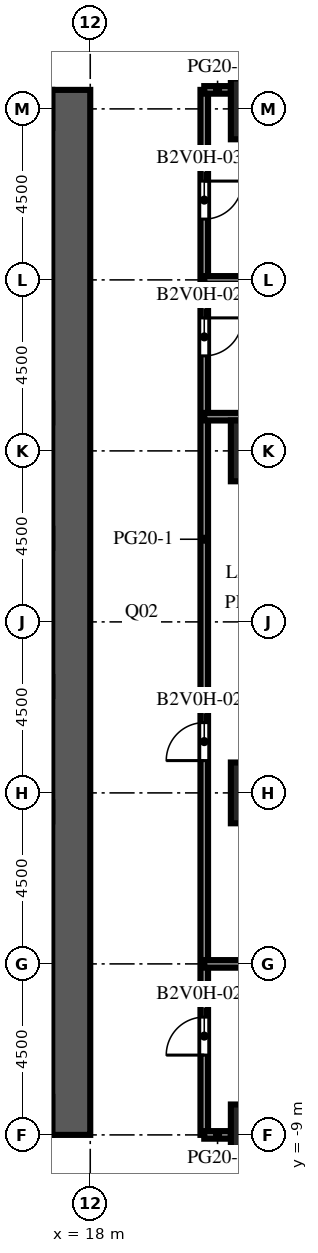
"""IFC4 building model, lengths in metres.
Left out: names, types, materials, properties, quantities, classifications, styles, units other than length and angle.
Written with IfcOpenShell. Run it as: python <this file> out.ifc"""

import sys

from ifc_helpers import new_model, si_unit, direction, frame, frame_2d, origin, origin_2d, place, context, subcontext, project, spatial, rectangle, extrude, element, fill, save


model = new_model("IFC4")
c1 = context("Model", 3, precision=1e-05, world=origin(), true_north=direction((0.0, 1.0)))
c2 = subcontext(c1, "Body", "Model", "MODEL_VIEW")
j1 = project(units=[si_unit("LENGTHUNIT", "METRE"), si_unit("PLANEANGLEUNIT", "RADIAN")], contexts=[c1])
p1 = place(None, origin())
s1 = spatial("IfcSite", under=j1, at=p1, CompositionType="ELEMENT")
p2 = place(p1, origin())
s2 = spatial("IfcBuilding", under=s1, at=p2, CompositionType="ELEMENT")
p3 = place(p2, frame((0.0, 0.0, 41.9)))
s3 = spatial("IfcBuildingStorey", under=s2, at=p3, CompositionType="ELEMENT", Elevation=41.9)
for number, where, z_axis, x_axis in (
    (1, (22.5, -9.0, -0.45), (0.0, 0.0, 1.0), (1.0, 0.0, 0.0)),
    (2, (22.5, 0.0, -0.45), (0.0, 0.0, 1.0), (1.0, 0.0, 0.0)),
    (3, (22.5, 9.0, -0.45), (0.0, 0.0, 1.0), (1.0, 0.0, 0.0)),
    (4, (22.5, 18.0, -0.45), (0.0, 0.0, 1.0), (1.0, 0.0, 0.0)),
):
    element("IfcColumn", number, at=place(p3, frame(where, z_axis=z_axis, x_axis=x_axis)), inside=s3, PredefinedType="COLUMN", context=c2, shape_type="SweptSolid", body=[
        extrude(rectangle(XDim=1.6, YDim=1.6, at=origin_2d()), origin(), (0.0, 0.0, 1.0), 4.55),
    ])
p4 = place(p3, frame((17.5, -9.0, 0.0), z_axis=(0.0, 0.0, 1.0), x_axis=(0.0, 1.0, 0.0)))
e5 = element("IfcWall", 5, at=p4, inside=s3, PredefinedType="SHEAR", context=c2, shape_type="SweptSolid", body=[
    extrude(rectangle(XDim=27.5, YDim=1.0, at=frame_2d((13.75, 0.0))), origin(), (0.0, 0.0, 1.0), 4.1),
])
p5 = place(p4, frame((12.55, 0.0, 0.0)))
e6 = element("IfcOpeningElement", 6, at=p5, cuts=e5, PredefinedType="OPENING", context=c2, shape_type="SweptSolid", body=[
    extrude(rectangle(XDim=2.4, YDim=2.4, at=frame_2d((1.2, 1.2))), frame((0.0, 0.51, 0.0), z_axis=(0.0, -1.0, 0.0), x_axis=(1.0, 0.0, 0.0)), (0.0, 0.0, 1.0), 1.02),
])
p6 = place(p4, frame((6.825, 0.0, 0.0)))
e7 = element("IfcOpeningElement", 7, at=p6, cuts=e5, PredefinedType="OPENING", context=c2, shape_type="SweptSolid", body=[
    extrude(rectangle(XDim=1.2, YDim=2.1, at=frame_2d((0.6, 1.05))), frame((0.0, 0.51, 0.0), z_axis=(0.0, -1.0, 0.0), x_axis=(1.0, 0.0, 0.0)), (0.0, 0.0, 1.0), 1.02),
])
p7 = place(p4, frame((19.475, 0.0, 0.0)))
e8 = element("IfcOpeningElement", 8, at=p7, cuts=e5, PredefinedType="OPENING", context=c2, shape_type="SweptSolid", body=[
    extrude(rectangle(XDim=1.2, YDim=2.1, at=frame_2d((0.6, 1.05))), frame((0.0, 0.51, 0.0), z_axis=(0.0, -1.0, 0.0), x_axis=(1.0, 0.0, 0.0)), (0.0, 0.0, 1.0), 1.02),
])
p8 = place(p3, frame((21.0, 18.5, 0.0), z_axis=(0.0, 0.0, 1.0), x_axis=(0.0, -1.0, 0.0)))
e9 = element("IfcWall", 9, at=p8, inside=s3, PredefinedType="PARTITIONING", context=c2, shape_type="SweptSolid", body=[
    extrude(rectangle(XDim=27.5, YDim=0.2, at=frame_2d((13.75, 0.0))), origin(), (0.0, 0.0, 1.0), 3.65),
])
p9 = place(p8, frame((24.4, 0.0, 0.0)))
e10 = element("IfcOpeningElement", 10, at=p9, cuts=e9, PredefinedType="OPENING", context=c2, shape_type="SweptSolid", body=[
    extrude(rectangle(XDim=1.0, YDim=2.1, at=frame_2d((0.5, 1.05))), frame((0.0, 0.11, 0.0), z_axis=(0.0, -1.0, 0.0), x_axis=(1.0, 0.0, 0.0)), (0.0, 0.0, 1.0), 0.22),
])
p10 = place(p8, frame((16.65, 0.0, 0.0)))
e11 = element("IfcOpeningElement", 11, at=p10, cuts=e9, PredefinedType="OPENING", context=c2, shape_type="SweptSolid", body=[
    extrude(rectangle(XDim=1.0, YDim=2.1, at=frame_2d((0.5, 1.05))), frame((0.0, 0.11, 0.0), z_axis=(0.0, -1.0, 0.0), x_axis=(1.0, 0.0, 0.0)), (0.0, 0.0, 1.0), 0.22),
])
p11 = place(p8, frame((6.0, 0.0, 0.0)))
e12 = element("IfcOpeningElement", 12, at=p11, cuts=e9, PredefinedType="OPENING", context=c2, shape_type="SweptSolid", body=[
    extrude(rectangle(XDim=1.0, YDim=2.1, at=frame_2d((0.5, 1.05))), frame((0.0, 0.11, 0.0), z_axis=(0.0, -1.0, 0.0), x_axis=(1.0, 0.0, 0.0)), (0.0, 0.0, 1.0), 0.22),
])
p12 = place(p8, frame((2.4, 0.0, 0.0)))
e13 = element("IfcOpeningElement", 13, at=p12, cuts=e9, PredefinedType="OPENING", context=c2, shape_type="SweptSolid", body=[
    extrude(rectangle(XDim=1.0, YDim=2.1, at=frame_2d((0.5, 1.05))), frame((0.0, 0.11, 0.0), z_axis=(0.0, -1.0, 0.0), x_axis=(1.0, 0.0, 0.0)), (0.0, 0.0, 1.0), 0.22),
])
p13 = place(p3, frame((21.0, -9.0, 0.0), z_axis=(0.0, 0.0, 1.0), x_axis=(1.0, 0.0, 0.0)))
e14 = element("IfcWall", 14, at=p13, inside=s3, PredefinedType="PARTITIONING", context=c2, shape_type="SweptSolid", body=[
    extrude(rectangle(XDim=0.7, YDim=0.2, at=frame_2d((0.35, 0.0))), origin(), (0.0, 0.0, 1.0), 3.65),
])
p14 = place(p3, frame((21.0, -4.5, 0.0), z_axis=(0.0, 0.0, 1.0), x_axis=(1.0, 0.0, 0.0)))
e15 = element("IfcWall", 15, at=p14, inside=s3, PredefinedType="PARTITIONING", context=c2, shape_type="SweptSolid", body=[
    extrude(rectangle(XDim=5.3, YDim=0.2, at=frame_2d((2.65, 0.0))), origin(), (0.0, 0.0, 1.0), 3.65),
])
p15 = place(p3, frame((21.0, 9.9, 0.0), z_axis=(0.0, 0.0, 1.0), x_axis=(1.0, 0.0, 0.0)))
e16 = element("IfcWall", 16, at=p15, inside=s3, PredefinedType="PARTITIONING", context=c2, shape_type="SweptSolid", body=[
    extrude(rectangle(XDim=10.35, YDim=0.2, at=frame_2d((5.175, 0.0))), origin(), (0.0, 0.0, 1.0), 3.65),
])
p16 = place(p3, frame((21.0, 13.5, 0.0), z_axis=(0.0, 0.0, 1.0), x_axis=(1.0, 0.0, 0.0)))
e17 = element("IfcWall", 17, at=p16, inside=s3, PredefinedType="PARTITIONING", context=c2, shape_type="SweptSolid", body=[
    extrude(rectangle(XDim=5.3, YDim=0.2, at=frame_2d((2.65, 0.0))), origin(), (0.0, 0.0, 1.0), 3.65),
])
p17 = place(p3, frame((21.0, 18.5, 0.0), z_axis=(0.0, 0.0, 1.0), x_axis=(1.0, 0.0, 0.0)))
e18 = element("IfcWall", 18, at=p17, inside=s3, PredefinedType="PARTITIONING", context=c2, shape_type="SweptSolid", body=[
    extrude(rectangle(XDim=0.7, YDim=0.2, at=frame_2d((0.35, 0.0))), origin(), (0.0, 0.0, 1.0), 3.65),
])
p18 = place(p5, origin())
e19 = element("IfcDoor", 19, at=p18, inside=s3, OperationType="DOUBLE_DOOR_DOUBLE_SWING", PredefinedType="DOOR", context=c2, shape_type="SweptSolid", body=[
    extrude(rectangle(XDim=2.4, YDim=2.4, at=frame_2d((1.2, 1.2))), frame((0.0, 0.025, 0.0), z_axis=(0.0, -1.0, 0.0), x_axis=(1.0, 0.0, 0.0)), (0.0, 0.0, 1.0), 0.05),
])
fill(e6, e19)
p19 = place(p6, frame((1.2, 0.0, 0.0), z_axis=(0.0, 0.0, 1.0), x_axis=(-1.0, 0.0, 0.0)))
e20 = element("IfcDoor", 20, at=p19, inside=s3, OperationType="SINGLE_SWING_LEFT", PredefinedType="DOOR", context=c2, shape_type="SweptSolid", body=[
    extrude(rectangle(XDim=1.2, YDim=2.1, at=frame_2d((0.6, 1.05))), frame((0.0, 0.025, 0.0), z_axis=(0.0, -1.0, 0.0), x_axis=(1.0, 0.0, 0.0)), (0.0, 0.0, 1.0), 0.05),
])
fill(e7, e20)
p20 = place(p7, frame((1.2, 0.0, 0.0), z_axis=(0.0, 0.0, 1.0), x_axis=(-1.0, 0.0, 0.0)))
e21 = element("IfcDoor", 21, at=p20, inside=s3, OperationType="SINGLE_SWING_LEFT", PredefinedType="DOOR", context=c2, shape_type="SweptSolid", body=[
    extrude(rectangle(XDim=1.2, YDim=2.1, at=frame_2d((0.6, 1.05))), frame((0.0, 0.025, 0.0), z_axis=(0.0, -1.0, 0.0), x_axis=(1.0, 0.0, 0.0)), (0.0, 0.0, 1.0), 0.05),
])
fill(e8, e21)
p21 = place(p9, origin())
e22 = element("IfcDoor", 22, at=p21, inside=s3, OperationType="SINGLE_SWING_RIGHT", PredefinedType="DOOR", context=c2, shape_type="SweptSolid", body=[
    extrude(rectangle(XDim=1.0, YDim=2.1, at=frame_2d((0.5, 1.05))), frame((0.0, 0.025, 0.0), z_axis=(0.0, -1.0, 0.0), x_axis=(1.0, 0.0, 0.0)), (0.0, 0.0, 1.0), 0.05),
])
fill(e10, e22)
p22 = place(p10, origin())
e23 = element("IfcDoor", 23, at=p22, inside=s3, OperationType="SINGLE_SWING_RIGHT", PredefinedType="DOOR", context=c2, shape_type="SweptSolid", body=[
    extrude(rectangle(XDim=1.0, YDim=2.1, at=frame_2d((0.5, 1.05))), frame((0.0, 0.025, 0.0), z_axis=(0.0, -1.0, 0.0), x_axis=(1.0, 0.0, 0.0)), (0.0, 0.0, 1.0), 0.05),
])
fill(e11, e23)
p23 = place(p11, origin())
e24 = element("IfcDoor", 24, at=p23, inside=s3, OperationType="SINGLE_SWING_LEFT", PredefinedType="DOOR", context=c2, shape_type="SweptSolid", body=[
    extrude(rectangle(XDim=1.0, YDim=2.1, at=frame_2d((0.5, 1.05))), frame((0.0, 0.025, 0.0), z_axis=(0.0, -1.0, 0.0), x_axis=(1.0, 0.0, 0.0)), (0.0, 0.0, 1.0), 0.05),
])
fill(e12, e24)
p24 = place(p12, origin())
e25 = element("IfcDoor", 25, at=p24, inside=s3, OperationType="SINGLE_SWING_LEFT", PredefinedType="DOOR", context=c2, shape_type="SweptSolid", body=[
    extrude(rectangle(XDim=1.0, YDim=2.1, at=frame_2d((0.5, 1.05))), frame((0.0, 0.025, 0.0), z_axis=(0.0, -1.0, 0.0), x_axis=(1.0, 0.0, 0.0)), (0.0, 0.0, 1.0), 0.05),
])
fill(e13, e25)
save(model, sys.argv[1])
